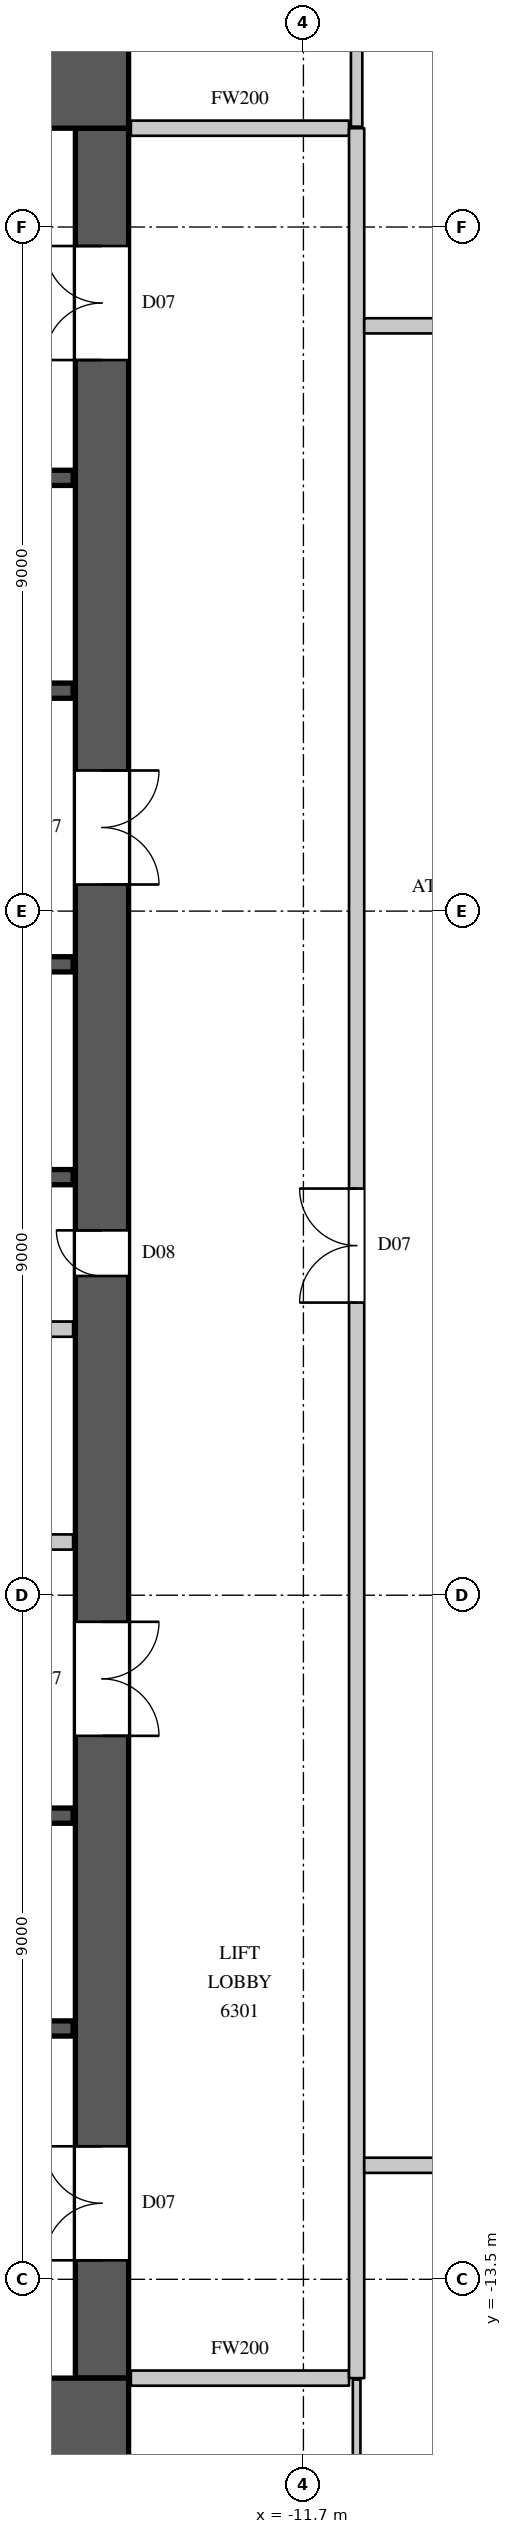
"""IFC4 building model, lengths in metres.
Left out: names, types, materials, properties, quantities, classifications, styles, units other than length and angle.
Written with IfcOpenShell. Run it as: python <this file> out.ifc"""

import sys

from ifc_helpers import new_model, si_unit, direction, frame, frame_2d, origin, place, context, subcontext, project, spatial, rectangle, extrude, element, fill, save


model = new_model("IFC4")
c1 = context("Model", 3, precision=1e-05, world=origin(), true_north=direction((0.0, 1.0)))
c2 = subcontext(c1, "Body", "Model", "MODEL_VIEW")
j1 = project(units=[si_unit("LENGTHUNIT", "METRE"), si_unit("PLANEANGLEUNIT", "RADIAN")], contexts=[c1])
p1 = place(None, origin())
s1 = spatial("IfcSite", under=j1, at=p1, CompositionType="ELEMENT")
p2 = place(p1, origin())
s2 = spatial("IfcBuilding", under=s1, at=p2, CompositionType="ELEMENT")
p3 = place(p2, frame((0.0, 0.0, 280.3)))
s3 = spatial("IfcBuildingStorey", under=s2, at=p3, CompositionType="ELEMENT", Elevation=280.3)
for number, where, z_axis, x_axis in (
    (1, (-30.0, 15.4, 0.0), (0.0, 0.0, 1.0), (1.0, 0.0, 0.0)),
    (2, (-30.0, -15.4, 0.0), (0.0, 0.0, 1.0), (1.0, 0.0, 0.0)),
):
    element("IfcWall", number, at=place(p3, frame(where, z_axis=z_axis, x_axis=x_axis)), inside=s3, PredefinedType="SHEAR", context=c2, shape_type="SweptSolid", body=[
        extrude(rectangle(XDim=16.0, YDim=1.2, at=frame_2d((8.0, 0.0))), origin(), (0.0, 0.0, 1.0), 4.1),
    ])
p4 = place(p3, frame((-14.35, -14.8, 0.0), z_axis=(0.0, 0.0, 1.0), x_axis=(0.0, 1.0, 0.0)))
e3 = element("IfcWall", 3, at=p4, inside=s3, PredefinedType="SHEAR", context=c2, shape_type="SweptSolid", body=[
    extrude(rectangle(XDim=29.6, YDim=0.7, at=frame_2d((14.8, 0.0))), origin(), (0.0, 0.0, 1.0), 4.1),
])
p5 = place(p4, frame((1.55, 0.0, 0.0)))
e4 = element("IfcOpeningElement", 4, at=p5, cuts=e3, PredefinedType="OPENING", context=c2, shape_type="SweptSolid", body=[
    extrude(rectangle(XDim=1.5, YDim=2.4, at=frame_2d((0.75, 1.2))), frame((0.0, 0.36, 0.0), z_axis=(0.0, -1.0, 0.0), x_axis=(1.0, 0.0, 0.0)), (0.0, 0.0, 1.0), 0.72),
])
p6 = place(p4, frame((26.55, 0.0, 0.0)))
e5 = element("IfcOpeningElement", 5, at=p6, cuts=e3, PredefinedType="OPENING", context=c2, shape_type="SweptSolid", body=[
    extrude(rectangle(XDim=1.5, YDim=2.4, at=frame_2d((0.75, 1.2))), frame((0.0, 0.36, 0.0), z_axis=(0.0, -1.0, 0.0), x_axis=(1.0, 0.0, 0.0)), (0.0, 0.0, 1.0), 0.72),
])
p7 = place(p4, frame((8.45, 0.0, 0.0)))
e6 = element("IfcOpeningElement", 6, at=p7, cuts=e3, PredefinedType="OPENING", context=c2, shape_type="SweptSolid", body=[
    extrude(rectangle(XDim=1.5, YDim=2.4, at=frame_2d((0.75, 1.2))), frame((0.0, 0.36, 0.0), z_axis=(0.0, -1.0, 0.0), x_axis=(1.0, 0.0, 0.0)), (0.0, 0.0, 1.0), 0.72),
])
p8 = place(p4, frame((19.65, 0.0, 0.0)))
e7 = element("IfcOpeningElement", 7, at=p8, cuts=e3, PredefinedType="OPENING", context=c2, shape_type="SweptSolid", body=[
    extrude(rectangle(XDim=1.5, YDim=2.4, at=frame_2d((0.75, 1.2))), frame((0.0, 0.36, 0.0), z_axis=(0.0, -1.0, 0.0), x_axis=(1.0, 0.0, 0.0)), (0.0, 0.0, 1.0), 0.72),
])
p9 = place(p4, frame((14.5, 0.0, 0.0)))
e8 = element("IfcOpeningElement", 8, at=p9, cuts=e3, PredefinedType="OPENING", context=c2, shape_type="SweptSolid", body=[
    extrude(rectangle(XDim=0.6, YDim=2.0, at=frame_2d((0.3, 1.0))), frame((0.0, 0.36, 0.0), z_axis=(0.0, -1.0, 0.0), x_axis=(1.0, 0.0, 0.0)), (0.0, 0.0, 1.0), 0.72),
])
p10 = place(p3, frame((-29.27, -3.8, 0.0), z_axis=(0.0, 0.0, 1.0), x_axis=(1.0, 0.0, 0.0)))
e9 = element("IfcWall", 9, at=p10, inside=s3, PredefinedType="PARTITIONING", context=c2, shape_type="SweptSolid", body=[
    extrude(rectangle(XDim=14.54, YDim=0.2, at=frame_2d((7.27, 0.0))), origin(), (0.0, 0.0, 1.0), 3.8),
])
p11 = place(p10, frame((1.15, 0.0, 0.0)))
e10 = element("IfcOpeningElement", 10, at=p11, cuts=e9, PredefinedType="OPENING", context=c2, shape_type="SweptSolid", body=[
    extrude(rectangle(XDim=0.9, YDim=2.2, at=frame_2d((0.45, 1.1))), frame((0.0, 0.11, 0.0), z_axis=(0.0, -1.0, 0.0), x_axis=(1.0, 0.0, 0.0)), (0.0, 0.0, 1.0), 0.22),
])
p12 = place(p10, frame((5.0, 0.0, 0.0)))
e11 = element("IfcOpeningElement", 11, at=p12, cuts=e9, PredefinedType="OPENING", context=c2, shape_type="SweptSolid", body=[
    extrude(rectangle(XDim=0.9, YDim=2.2, at=frame_2d((0.45, 1.1))), frame((0.0, 0.11, 0.0), z_axis=(0.0, -1.0, 0.0), x_axis=(1.0, 0.0, 0.0)), (0.0, 0.0, 1.0), 0.22),
])
p13 = place(p10, frame((10.65, 0.0, 0.0)))
e12 = element("IfcOpeningElement", 12, at=p13, cuts=e9, PredefinedType="OPENING", context=c2, shape_type="SweptSolid", body=[
    extrude(rectangle(XDim=0.9, YDim=2.2, at=frame_2d((0.45, 1.1))), frame((0.0, 0.11, 0.0), z_axis=(0.0, -1.0, 0.0), x_axis=(1.0, 0.0, 0.0)), (0.0, 0.0, 1.0), 0.22),
])
for number, where, z_axis, x_axis in (
    (13, (-13.97, -14.8, 0.0), (0.0, 0.0, 1.0), (1.0, 0.0, 0.0)),
    (14, (-13.97, 14.8, 0.0), (0.0, 0.0, 1.0), (1.0, 0.0, 0.0)),
):
    element("IfcWall", number, at=place(p3, frame(where, z_axis=z_axis, x_axis=x_axis)), inside=s3, PredefinedType="PARTITIONING", context=c2, shape_type="SweptSolid", body=[
        extrude(rectangle(XDim=2.87, YDim=0.2, at=frame_2d((1.435, 0.0))), origin(), (0.0, 0.0, 1.0), 3.8),
    ])
p14 = place(p3, frame((-11.0, -14.8, 0.0), z_axis=(0.0, 0.0, 1.0), x_axis=(0.0, 1.0, 0.0)))
e15 = element("IfcWall", 15, at=p14, inside=s3, PredefinedType="PARTITIONING", context=c2, shape_type="SweptSolid", body=[
    extrude(rectangle(XDim=29.6, YDim=0.2, at=frame_2d((14.8, 0.0))), origin(), (0.0, 0.0, 1.0), 3.8),
])
p15 = place(p14, frame((14.15, 0.0, 0.0)))
e16 = element("IfcOpeningElement", 16, at=p15, cuts=e15, PredefinedType="OPENING", context=c2, shape_type="SweptSolid", body=[
    extrude(rectangle(XDim=1.5, YDim=2.4, at=frame_2d((0.75, 1.2))), frame((0.0, 0.11, 0.0), z_axis=(0.0, -1.0, 0.0), x_axis=(1.0, 0.0, 0.0)), (0.0, 0.0, 1.0), 0.22),
])
p16 = place(p3, frame((-10.9, -12.0, 0.0), z_axis=(0.0, 0.0, 1.0), x_axis=(1.0, 0.0, 0.0)))
e17 = element("IfcWall", 17, at=p16, inside=s3, PredefinedType="PARTITIONING", context=c2, shape_type="SweptSolid", body=[
    extrude(rectangle(XDim=21.8, YDim=0.2, at=frame_2d((10.9, 0.0))), origin(), (0.0, 0.0, 1.0), 3.8),
])
p17 = place(p16, frame((1.1, 0.0, 0.0)))
e18 = element("IfcOpeningElement", 18, at=p17, cuts=e17, PredefinedType="OPENING", context=c2, shape_type="SweptSolid", body=[
    extrude(rectangle(XDim=0.9, YDim=2.2, at=frame_2d((0.45, 1.1))), frame((0.0, 0.11, 0.0), z_axis=(0.0, -1.0, 0.0), x_axis=(1.0, 0.0, 0.0)), (0.0, 0.0, 1.0), 0.22),
])
p18 = place(p16, frame((4.9, 0.0, 0.0)))
e19 = element("IfcOpeningElement", 19, at=p18, cuts=e17, PredefinedType="OPENING", context=c2, shape_type="SweptSolid", body=[
    extrude(rectangle(XDim=0.9, YDim=2.2, at=frame_2d((0.45, 1.1))), frame((0.0, 0.11, 0.0), z_axis=(0.0, -1.0, 0.0), x_axis=(1.0, 0.0, 0.0)), (0.0, 0.0, 1.0), 0.22),
])
p19 = place(p16, frame((7.0, 0.0, 0.0)))
e20 = element("IfcOpeningElement", 20, at=p19, cuts=e17, PredefinedType="OPENING", context=c2, shape_type="SweptSolid", body=[
    extrude(rectangle(XDim=0.9, YDim=2.2, at=frame_2d((0.45, 1.1))), frame((0.0, 0.11, 0.0), z_axis=(0.0, -1.0, 0.0), x_axis=(1.0, 0.0, 0.0)), (0.0, 0.0, 1.0), 0.22),
])
p20 = place(p16, frame((9.95, 0.0, 0.0)))
e21 = element("IfcOpeningElement", 21, at=p20, cuts=e17, PredefinedType="OPENING", context=c2, shape_type="SweptSolid", body=[
    extrude(rectangle(XDim=1.1, YDim=2.4, at=frame_2d((0.55, 1.2))), frame((0.0, 0.11, 0.0), z_axis=(0.0, -1.0, 0.0), x_axis=(1.0, 0.0, 0.0)), (0.0, 0.0, 1.0), 0.22),
])
p21 = place(p3, frame((-10.9, 12.2, 0.0), z_axis=(0.0, 0.0, 1.0), x_axis=(1.0, 0.0, 0.0)))
e22 = element("IfcWall", 22, at=p21, inside=s3, PredefinedType="PARTITIONING", context=c2, shape_type="SweptSolid", body=[
    extrude(rectangle(XDim=3.756, YDim=0.2, at=frame_2d((1.878, 0.0))), origin(), (0.0, 0.0, 1.0), 3.8),
])
p22 = place(p21, frame((0.95, 0.0, 0.0)))
e23 = element("IfcOpeningElement", 23, at=p22, cuts=e22, PredefinedType="OPENING", context=c2, shape_type="SweptSolid", body=[
    extrude(rectangle(XDim=1.1, YDim=2.4, at=frame_2d((0.55, 1.2))), frame((0.0, 0.11, 0.0), z_axis=(0.0, -1.0, 0.0), x_axis=(1.0, 0.0, 0.0)), (0.0, 0.0, 1.0), 0.22),
])
p23 = place(p3, frame((-11.0, 14.82, 0.0), z_axis=(0.0, 0.0, 1.0), x_axis=(0.0, 1.0, 0.0)))
e24 = element("IfcWall", 24, at=p23, inside=s3, PredefinedType="PARTITIONING", context=c2, shape_type="SweptSolid", body=[
    extrude(rectangle(XDim=9.883, YDim=0.15, at=frame_2d((4.942, 0.0))), origin(), (0.0, 0.0, 1.0), 3.8),
])
p24 = place(p3, frame((-29.27, -1.0, 0.0), z_axis=(0.0, 0.0, 1.0), x_axis=(1.0, 0.0, 0.0)))
e25 = element("IfcWall", 25, at=p24, inside=s3, PredefinedType="PARTITIONING", context=c2, shape_type="SweptSolid", body=[
    extrude(rectangle(XDim=14.54, YDim=0.2, at=frame_2d((7.27, 0.0))), origin(), (0.0, 0.0, 1.0), 3.8),
])
p25 = place(p3, frame((-17.92, -10.2, 0.0), z_axis=(0.0, 0.0, 1.0), x_axis=(1.0, 0.0, 0.0)))
e26 = element("IfcWall", 26, at=p25, inside=s3, PredefinedType="SHEAR", context=c2, shape_type="SweptSolid", body=[
    extrude(rectangle(XDim=3.19, YDim=0.2, at=frame_2d((1.595, 0.0))), origin(), (0.0, 0.0, 1.0), 3.8),
])
p26 = place(p25, frame((1.05, 0.0, 0.0)))
e27 = element("IfcOpeningElement", 27, at=p26, cuts=e26, PredefinedType="OPENING", context=c2, shape_type="SweptSolid", body=[
    extrude(rectangle(XDim=1.1, YDim=2.2, at=frame_2d((0.55, 1.1))), frame((0.0, 0.11, 0.0), z_axis=(0.0, -1.0, 0.0), x_axis=(1.0, 0.0, 0.0)), (0.0, 0.0, 1.0), 0.22),
])
for number, where, z_axis, x_axis in (
    (28, (-17.9, -7.4, 0.0), (0.0, 0.0, 1.0), (1.0, 0.0, 0.0)),
    (29, (-17.9, 1.0, 0.0), (0.0, 0.0, 1.0), (1.0, 0.0, 0.0)),
):
    element("IfcWall", number, at=place(p3, frame(where, z_axis=z_axis, x_axis=x_axis)), inside=s3, PredefinedType="SHEAR", context=c2, shape_type="SweptSolid", body=[
        extrude(rectangle(XDim=3.17, YDim=0.2, at=frame_2d((1.585, 0.0))), origin(), (0.0, 0.0, 1.0), 3.8),
    ])
p27 = place(p3, frame((-17.9, 3.8, 0.0), z_axis=(0.0, 0.0, 1.0), x_axis=(1.0, 0.0, 0.0)))
e30 = element("IfcWall", 30, at=p27, inside=s3, PredefinedType="SHEAR", context=c2, shape_type="SweptSolid", body=[
    extrude(rectangle(XDim=3.17, YDim=0.2, at=frame_2d((1.585, 0.0))), origin(), (0.0, 0.0, 1.0), 3.8),
])
p28 = place(p27, frame((1.05, 0.0, 0.0)))
e31 = element("IfcOpeningElement", 31, at=p28, cuts=e30, PredefinedType="OPENING", context=c2, shape_type="SweptSolid", body=[
    extrude(rectangle(XDim=1.1, YDim=2.2, at=frame_2d((0.55, 1.1))), frame((0.0, 0.11, 0.0), z_axis=(0.0, -1.0, 0.0), x_axis=(1.0, 0.0, 0.0)), (0.0, 0.0, 1.0), 0.22),
])
p29 = place(p3, frame((-17.92, 7.4, 0.0), z_axis=(0.0, 0.0, 1.0), x_axis=(1.0, 0.0, 0.0)))
e32 = element("IfcWall", 32, at=p29, inside=s3, PredefinedType="SHEAR", context=c2, shape_type="SweptSolid", body=[
    extrude(rectangle(XDim=3.19, YDim=0.2, at=frame_2d((1.595, 0.0))), origin(), (0.0, 0.0, 1.0), 3.8),
])
p30 = place(p3, frame((-17.92, 10.2, 0.0), z_axis=(0.0, 0.0, 1.0), x_axis=(1.0, 0.0, 0.0)))
e33 = element("IfcWall", 33, at=p30, inside=s3, PredefinedType="SHEAR", context=c2, shape_type="SweptSolid", body=[
    extrude(rectangle(XDim=3.19, YDim=0.2, at=frame_2d((1.595, 0.0))), origin(), (0.0, 0.0, 1.0), 3.8),
])
p31 = place(p30, frame((1.05, 0.0, 0.0)))
e34 = element("IfcOpeningElement", 34, at=p31, cuts=e33, PredefinedType="OPENING", context=c2, shape_type="SweptSolid", body=[
    extrude(rectangle(XDim=1.1, YDim=2.2, at=frame_2d((0.55, 1.1))), frame((0.0, 0.11, 0.0), z_axis=(0.0, -1.0, 0.0), x_axis=(1.0, 0.0, 0.0)), (0.0, 0.0, 1.0), 0.22),
])
p32 = place(p3, frame((-11.0, -23.757, 0.0), z_axis=(0.0, 0.0, 1.0), x_axis=(0.0, 1.0, 0.0)))
e35 = element("IfcWall", 35, at=p32, inside=s3, PredefinedType="PARTITIONING", context=c2, shape_type="SweptSolid", body=[
    extrude(rectangle(XDim=8.937, YDim=0.1, at=frame_2d((4.468, 0.0))), origin(), (0.0, 0.0, 1.0), 3.8),
])
p33 = place(p15, origin())
e36 = element("IfcDoor", 36, at=p33, inside=s3, OperationType="DOUBLE_DOOR_SINGLE_SWING", PredefinedType="DOOR", context=c2, shape_type="SweptSolid", body=[
    extrude(rectangle(XDim=1.5, YDim=2.4, at=frame_2d((0.75, 1.2))), frame((0.0, 0.025, 0.0), z_axis=(0.0, -1.0, 0.0), x_axis=(1.0, 0.0, 0.0)), (0.0, 0.0, 1.0), 0.05),
])
fill(e16, e36)
p34 = place(p5, origin())
e37 = element("IfcDoor", 37, at=p34, inside=s3, OperationType="DOUBLE_DOOR_SINGLE_SWING", PredefinedType="DOOR", context=c2, shape_type="SweptSolid", body=[
    extrude(rectangle(XDim=1.5, YDim=2.4, at=frame_2d((0.75, 1.2))), frame((0.0, 0.345, 0.0), z_axis=(0.0, -1.0, 0.0), x_axis=(1.0, 0.0, 0.0)), (0.0, 0.0, 1.0), 0.05),
])
fill(e4, e37)
p35 = place(p6, origin())
e38 = element("IfcDoor", 38, at=p35, inside=s3, OperationType="DOUBLE_DOOR_SINGLE_SWING", PredefinedType="DOOR", context=c2, shape_type="SweptSolid", body=[
    extrude(rectangle(XDim=1.5, YDim=2.4, at=frame_2d((0.75, 1.2))), frame((0.0, 0.345, 0.0), z_axis=(0.0, -1.0, 0.0), x_axis=(1.0, 0.0, 0.0)), (0.0, 0.0, 1.0), 0.05),
])
fill(e5, e38)
p36 = place(p7, origin())
e39 = element("IfcDoor", 39, at=p36, inside=s3, OperationType="DOUBLE_DOOR_SINGLE_SWING", PredefinedType="DOOR", context=c2, shape_type="SweptSolid", body=[
    extrude(rectangle(XDim=1.5, YDim=2.4, at=frame_2d((0.75, 1.2))), frame((0.0, -0.295, 0.0), z_axis=(0.0, -1.0, 0.0), x_axis=(1.0, 0.0, 0.0)), (0.0, 0.0, 1.0), 0.05),
])
fill(e6, e39)
p37 = place(p8, origin())
e40 = element("IfcDoor", 40, at=p37, inside=s3, OperationType="DOUBLE_DOOR_SINGLE_SWING", PredefinedType="DOOR", context=c2, shape_type="SweptSolid", body=[
    extrude(rectangle(XDim=1.5, YDim=2.4, at=frame_2d((0.75, 1.2))), frame((0.0, -0.295, 0.0), z_axis=(0.0, -1.0, 0.0), x_axis=(1.0, 0.0, 0.0)), (0.0, 0.0, 1.0), 0.05),
])
fill(e7, e40)
p38 = place(p9, origin())
e41 = element("IfcDoor", 41, at=p38, inside=s3, OperationType="SINGLE_SWING_RIGHT", PredefinedType="DOOR", context=c2, shape_type="SweptSolid", body=[
    extrude(rectangle(XDim=0.6, YDim=2.0, at=frame_2d((0.3, 1.0))), frame((0.0, 0.345, 0.0), z_axis=(0.0, -1.0, 0.0), x_axis=(1.0, 0.0, 0.0)), (0.0, 0.0, 1.0), 0.05),
])
fill(e8, e41)
save(model, sys.argv[1])
